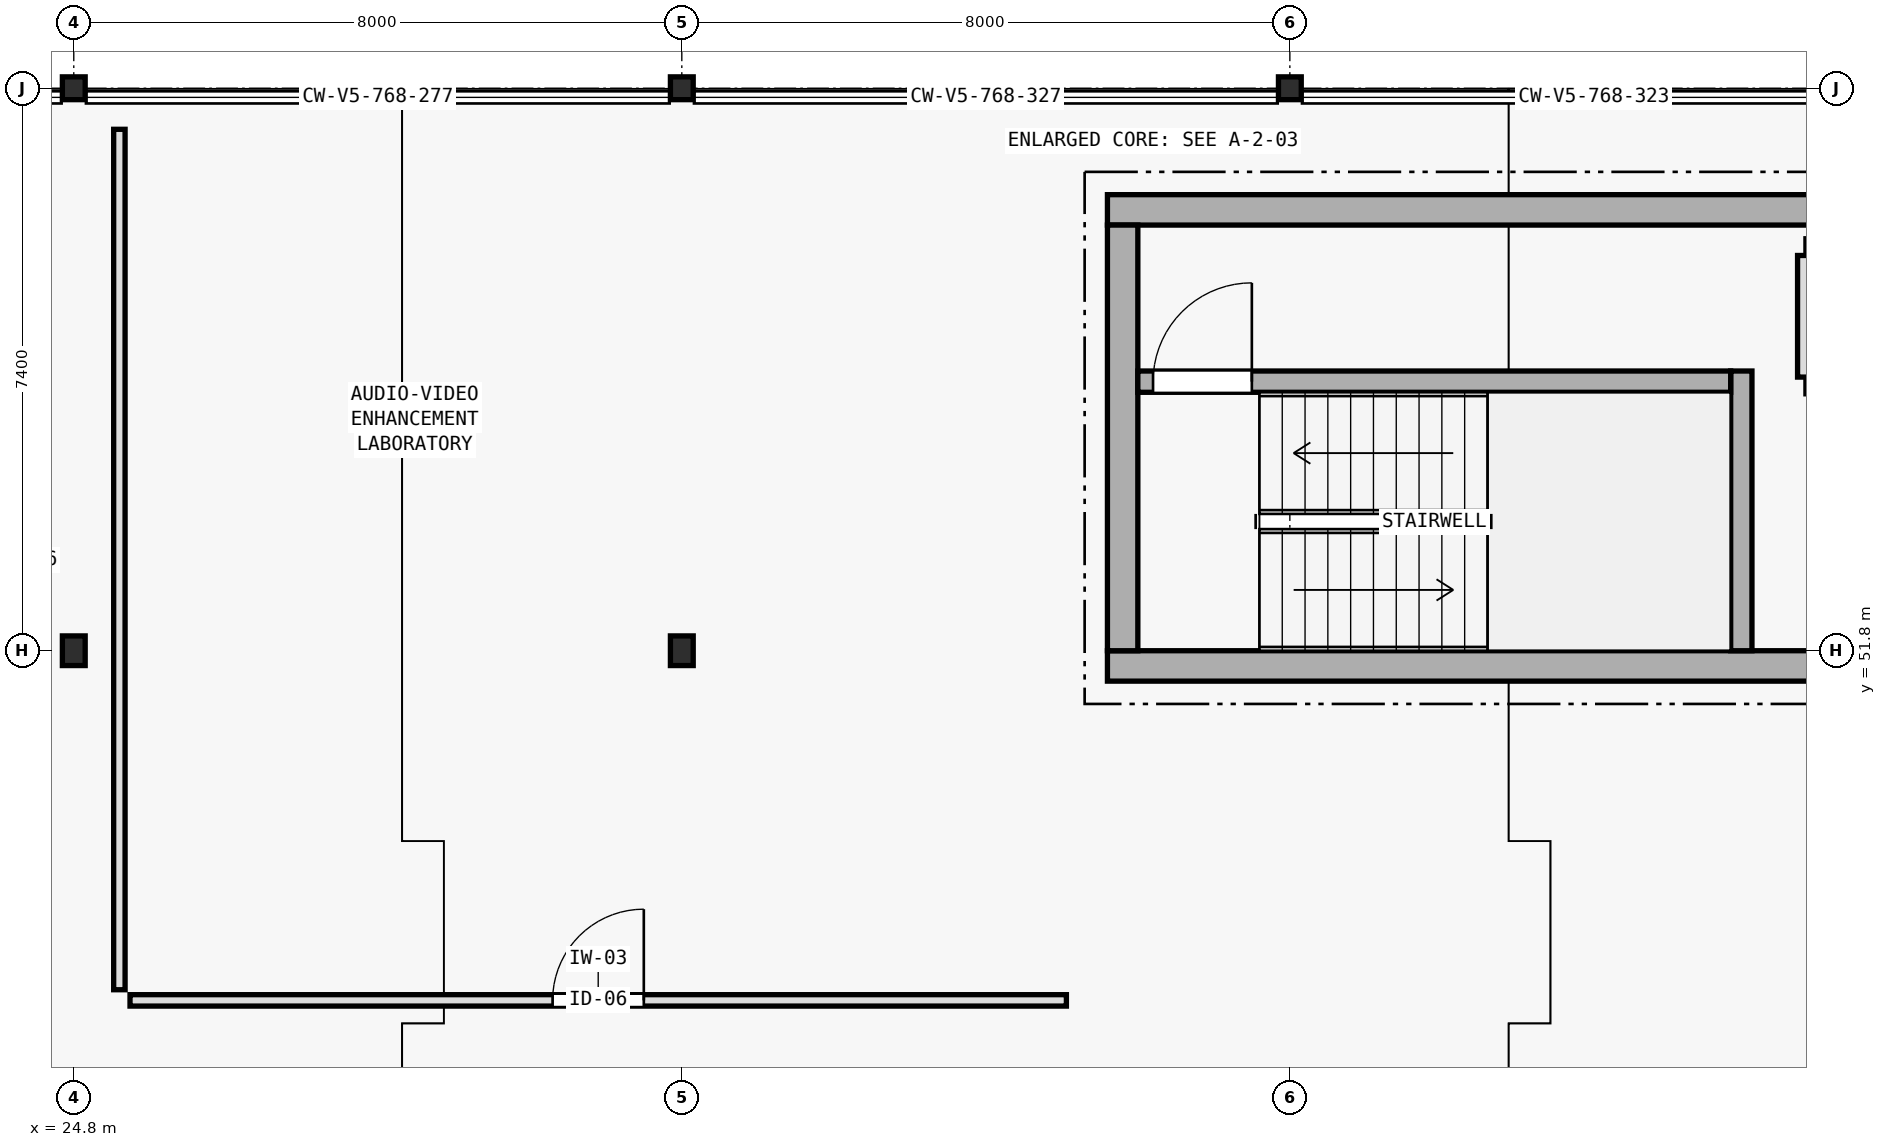
"""IFC4 building model, lengths in metres.
Left out: names, types, materials, properties, quantities, classifications, styles, units other than length and angle.
Written with IfcOpenShell. Run it as: python <this file> out.ifc"""

import sys

from ifc_helpers import new_model, si_unit, direction, frame, frame_2d, origin, origin_2d, place, context, subcontext, project, spatial, rectangle, i_section, extrude, element, fill, save


model = new_model("IFC4")
c1 = context("Model", 3, precision=1e-05, world=origin(), true_north=direction((0.0, 1.0)))
c2 = subcontext(c1, "Body", "Model", "MODEL_VIEW")
j1 = project(units=[si_unit("LENGTHUNIT", "METRE"), si_unit("PLANEANGLEUNIT", "RADIAN")], contexts=[c1])
p1 = place(None, origin())
s1 = spatial("IfcSite", under=j1, at=p1, CompositionType="ELEMENT")
p2 = place(p1, origin())
s2 = spatial("IfcBuilding", under=s1, at=p2, CompositionType="ELEMENT")
p3 = place(p2, frame((0.0, 0.0, 27.2)))
s3 = spatial("IfcBuildingStorey", under=s2, at=p3, CompositionType="ELEMENT", Elevation=27.2)
p4 = place(p3, frame((38.4, 51.6, 0.0), z_axis=(0.0, 0.0, 1.0), x_axis=(1.0, 0.0, 0.0)))
e1 = element("IfcWall", 1, at=p4, inside=s3, PredefinedType="SHEAR", context=c2, shape_type="SweptSolid", body=[
    extrude(rectangle(XDim=15.2, YDim=0.4, at=frame_2d((7.6, 0.0))), origin(), (0.0, 0.0, 1.0), 3.895),
])
p5 = place(p4, frame((10.25, 0.0, 0.0)))
e2 = element("IfcOpeningElement", 2, at=p5, cuts=e1, PredefinedType="OPENING", context=c2, shape_type="SweptSolid", body=[
    extrude(rectangle(XDim=1.3, YDim=2.2, at=frame_2d((0.65, 1.1))), frame((0.0, 0.21, 0.0), z_axis=(0.0, -1.0, 0.0), x_axis=(1.0, 0.0, 0.0)), (0.0, 0.0, 1.0), 0.42),
])
p6 = place(p3, frame((38.4, 57.6, 0.0), z_axis=(0.0, 0.0, 1.0), x_axis=(1.0, 0.0, 0.0)))
e3 = element("IfcWall", 3, at=p6, inside=s3, PredefinedType="SHEAR", context=c2, shape_type="SweptSolid", body=[
    extrude(rectangle(XDim=15.2, YDim=0.4, at=frame_2d((7.6, 0.0))), origin(), (0.0, 0.0, 1.0), 3.895),
])
p7 = place(p3, frame((38.6, 51.8, 0.0), z_axis=(0.0, 0.0, 1.0), x_axis=(0.0, 1.0, 0.0)))
e4 = element("IfcWall", 4, at=p7, inside=s3, PredefinedType="SHEAR", context=c2, shape_type="SweptSolid", body=[
    extrude(rectangle(XDim=5.6, YDim=0.4, at=frame_2d((2.8, 0.0))), origin(), (0.0, 0.0, 1.0), 3.895),
])
p8 = place(p3, frame((46.74, 51.8, 0.0), z_axis=(0.0, 0.0, 1.0), x_axis=(0.0, 1.0, 0.0)))
e5 = element("IfcWall", 5, at=p8, inside=s3, PredefinedType="SHEAR", context=c2, shape_type="SweptSolid", body=[
    extrude(rectangle(XDim=3.68, YDim=0.28, at=frame_2d((1.84, 0.0))), origin(), (0.0, 0.0, 1.0), 3.895),
])
p9 = place(p3, frame((38.8, 55.34, 0.0), z_axis=(0.0, 0.0, 1.0), x_axis=(1.0, 0.0, 0.0)))
e6 = element("IfcWall", 6, at=p9, inside=s3, PredefinedType="SHEAR", context=c2, shape_type="SweptSolid", body=[
    extrude(rectangle(XDim=7.8, YDim=0.28, at=frame_2d((3.9, 0.0))), origin(), (0.0, 0.0, 1.0), 3.895),
])
p10 = place(p9, frame((0.2, 0.0, 0.0)))
e7 = element("IfcOpeningElement", 7, at=p10, cuts=e6, PredefinedType="OPENING", context=c2, shape_type="SweptSolid", body=[
    extrude(rectangle(XDim=1.3, YDim=2.2, at=frame_2d((0.65, 1.1))), frame((0.0, 0.15, 0.0), z_axis=(0.0, -1.0, 0.0), x_axis=(1.0, 0.0, 0.0)), (0.0, 0.0, 1.0), 0.3),
])
p11 = place(p3, frame((24.8, 51.8, 0.0), z_axis=(0.0, 0.0, 1.0), x_axis=(1.0, 0.0, 0.0)))
e8 = element("IfcColumn", 8, at=p11, inside=s3, PredefinedType="COLUMN", context=c2, shape_type="SweptSolid", body=[
    extrude(i_section(OverallWidth=0.3, OverallDepth=0.39, WebThickness=0.011, FlangeThickness=0.019, FilletRadius=0.027, at=origin_2d()), origin(), (0.0, 0.0, 1.0), 3.9),
])
p12 = place(p3, frame((24.8, 59.2, 0.0), z_axis=(0.0, 0.0, 1.0), x_axis=(1.0, 0.0, 0.0)))
e9 = element("IfcColumn", 9, at=p12, inside=s3, PredefinedType="COLUMN", context=c2, shape_type="SweptSolid", body=[
    extrude(i_section(OverallWidth=0.3, OverallDepth=0.3, WebThickness=0.011, FlangeThickness=0.019, FilletRadius=0.027, at=origin_2d()), origin(), (0.0, 0.0, 1.0), 3.9),
])
p13 = place(p3, frame((32.8, 51.8, 0.0), z_axis=(0.0, 0.0, 1.0), x_axis=(1.0, 0.0, 0.0)))
e10 = element("IfcColumn", 10, at=p13, inside=s3, PredefinedType="COLUMN", context=c2, shape_type="SweptSolid", body=[
    extrude(i_section(OverallWidth=0.3, OverallDepth=0.39, WebThickness=0.011, FlangeThickness=0.019, FilletRadius=0.027, at=origin_2d()), origin(), (0.0, 0.0, 1.0), 3.9),
])
for number, where, z_axis, x_axis in (
    (11, (32.8, 59.2, 0.0), (0.0, 0.0, 1.0), (1.0, 0.0, 0.0)),
    (12, (40.8, 59.2, 0.0), (0.0, 0.0, 1.0), (1.0, 0.0, 0.0)),
):
    element("IfcColumn", number, at=place(p3, frame(where, z_axis=z_axis, x_axis=x_axis)), inside=s3, PredefinedType="COLUMN", context=c2, shape_type="SweptSolid", body=[
        extrude(i_section(OverallWidth=0.3, OverallDepth=0.3, WebThickness=0.011, FlangeThickness=0.019, FilletRadius=0.027, at=origin_2d()), origin(), (0.0, 0.0, 1.0), 3.9),
    ])
p14 = place(p3, frame((47.59, 55.29, 0.0), z_axis=(0.0, 0.0, 1.0), x_axis=(1.0, 0.0, 0.0)))
e13 = element("IfcWall", 13, at=p14, inside=s3, PredefinedType="PLUMBINGWALL", context=c2, shape_type="SweptSolid", body=[
    extrude(rectangle(XDim=1.62, YDim=0.22, at=frame_2d((0.81, 0.0))), origin(), (0.0, 0.0, 1.0), 3.68),
])
p15 = place(p14, frame((0.31, 0.0, 0.0)))
e14 = element("IfcOpeningElement", 14, at=p15, cuts=e13, PredefinedType="OPENING", context=c2, shape_type="SweptSolid", body=[
    extrude(rectangle(XDim=1.0, YDim=2.2, at=frame_2d((0.5, 1.1))), frame((0.0, 0.12, 0.0), z_axis=(0.0, -1.0, 0.0), x_axis=(1.0, 0.0, 0.0)), (0.0, 0.0, 1.0), 0.24),
])
p16 = place(p3, frame((47.59, 57.11, 0.0), z_axis=(0.0, 0.0, 1.0), x_axis=(1.0, 0.0, 0.0)))
e15 = element("IfcWall", 15, at=p16, inside=s3, PredefinedType="PLUMBINGWALL", context=c2, shape_type="SweptSolid", body=[
    extrude(rectangle(XDim=1.62, YDim=0.22, at=frame_2d((0.81, 0.0))), origin(), (0.0, 0.0, 1.0), 3.68),
])
p17 = place(p3, frame((47.59, 55.4, 0.0), z_axis=(0.0, 0.0, 1.0), x_axis=(0.0, 1.0, 0.0)))
e16 = element("IfcWall", 16, at=p17, inside=s3, PredefinedType="PLUMBINGWALL", context=c2, shape_type="SweptSolid", body=[
    extrude(rectangle(XDim=1.6, YDim=0.22, at=frame_2d((0.8, 0.0))), origin(), (0.0, 0.0, 1.0), 3.68),
])
p18 = place(p3, frame((25.54, 47.2, 0.0), z_axis=(0.0, 0.0, 1.0), x_axis=(1.0, 0.0, 0.0)))
e17 = element("IfcWall", 17, at=p18, inside=s3, PredefinedType="PARTITIONING", context=c2, shape_type="SweptSolid", body=[
    extrude(rectangle(XDim=12.32, YDim=0.15, at=frame_2d((6.16, 0.0))), origin(), (0.0, 0.0, 1.0), 3.26),
])
p19 = place(p18, frame((5.56, 0.0, 0.0)))
e18 = element("IfcOpeningElement", 18, at=p19, cuts=e17, PredefinedType="OPENING", context=c2, shape_type="SweptSolid", body=[
    extrude(rectangle(XDim=1.2, YDim=2.2, at=frame_2d((0.6, 1.1))), frame((0.0, 0.085, 0.0), z_axis=(0.0, -1.0, 0.0), x_axis=(1.0, 0.0, 0.0)), (0.0, 0.0, 1.0), 0.17),
])
p20 = place(p3, frame((25.4, 47.34, 0.0), z_axis=(0.0, 0.0, 1.0), x_axis=(0.0, 1.0, 0.0)))
e19 = element("IfcWall", 19, at=p20, inside=s3, PredefinedType="PARTITIONING", context=c2, shape_type="SweptSolid", body=[
    extrude(rectangle(XDim=11.32, YDim=0.15, at=frame_2d((5.66, 0.0))), origin(), (0.0, 0.0, 1.0), 3.26),
])
p21 = place(p10, origin())
e20 = element("IfcDoor", 20, at=p21, inside=s3, OperationType="SINGLE_SWING_RIGHT", PredefinedType="DOOR", context=c2, shape_type="SweptSolid", body=[
    extrude(rectangle(XDim=1.3, YDim=2.2, at=frame_2d((0.65, 1.1))), frame((0.0, 0.025, 0.0), z_axis=(0.0, -1.0, 0.0), x_axis=(1.0, 0.0, 0.0)), (0.0, 0.0, 1.0), 0.05),
])
fill(e7, e20)
p22 = place(p19, origin())
e21 = element("IfcDoor", 21, at=p22, inside=s3, OperationType="SINGLE_SWING_RIGHT", PredefinedType="DOOR", context=c2, shape_type="SweptSolid", body=[
    extrude(rectangle(XDim=1.2, YDim=2.2, at=frame_2d((0.6, 1.1))), frame((0.0, 0.025, 0.0), z_axis=(0.0, -1.0, 0.0), x_axis=(1.0, 0.0, 0.0)), (0.0, 0.0, 1.0), 0.05),
])
fill(e18, e21)
save(model, sys.argv[1])
